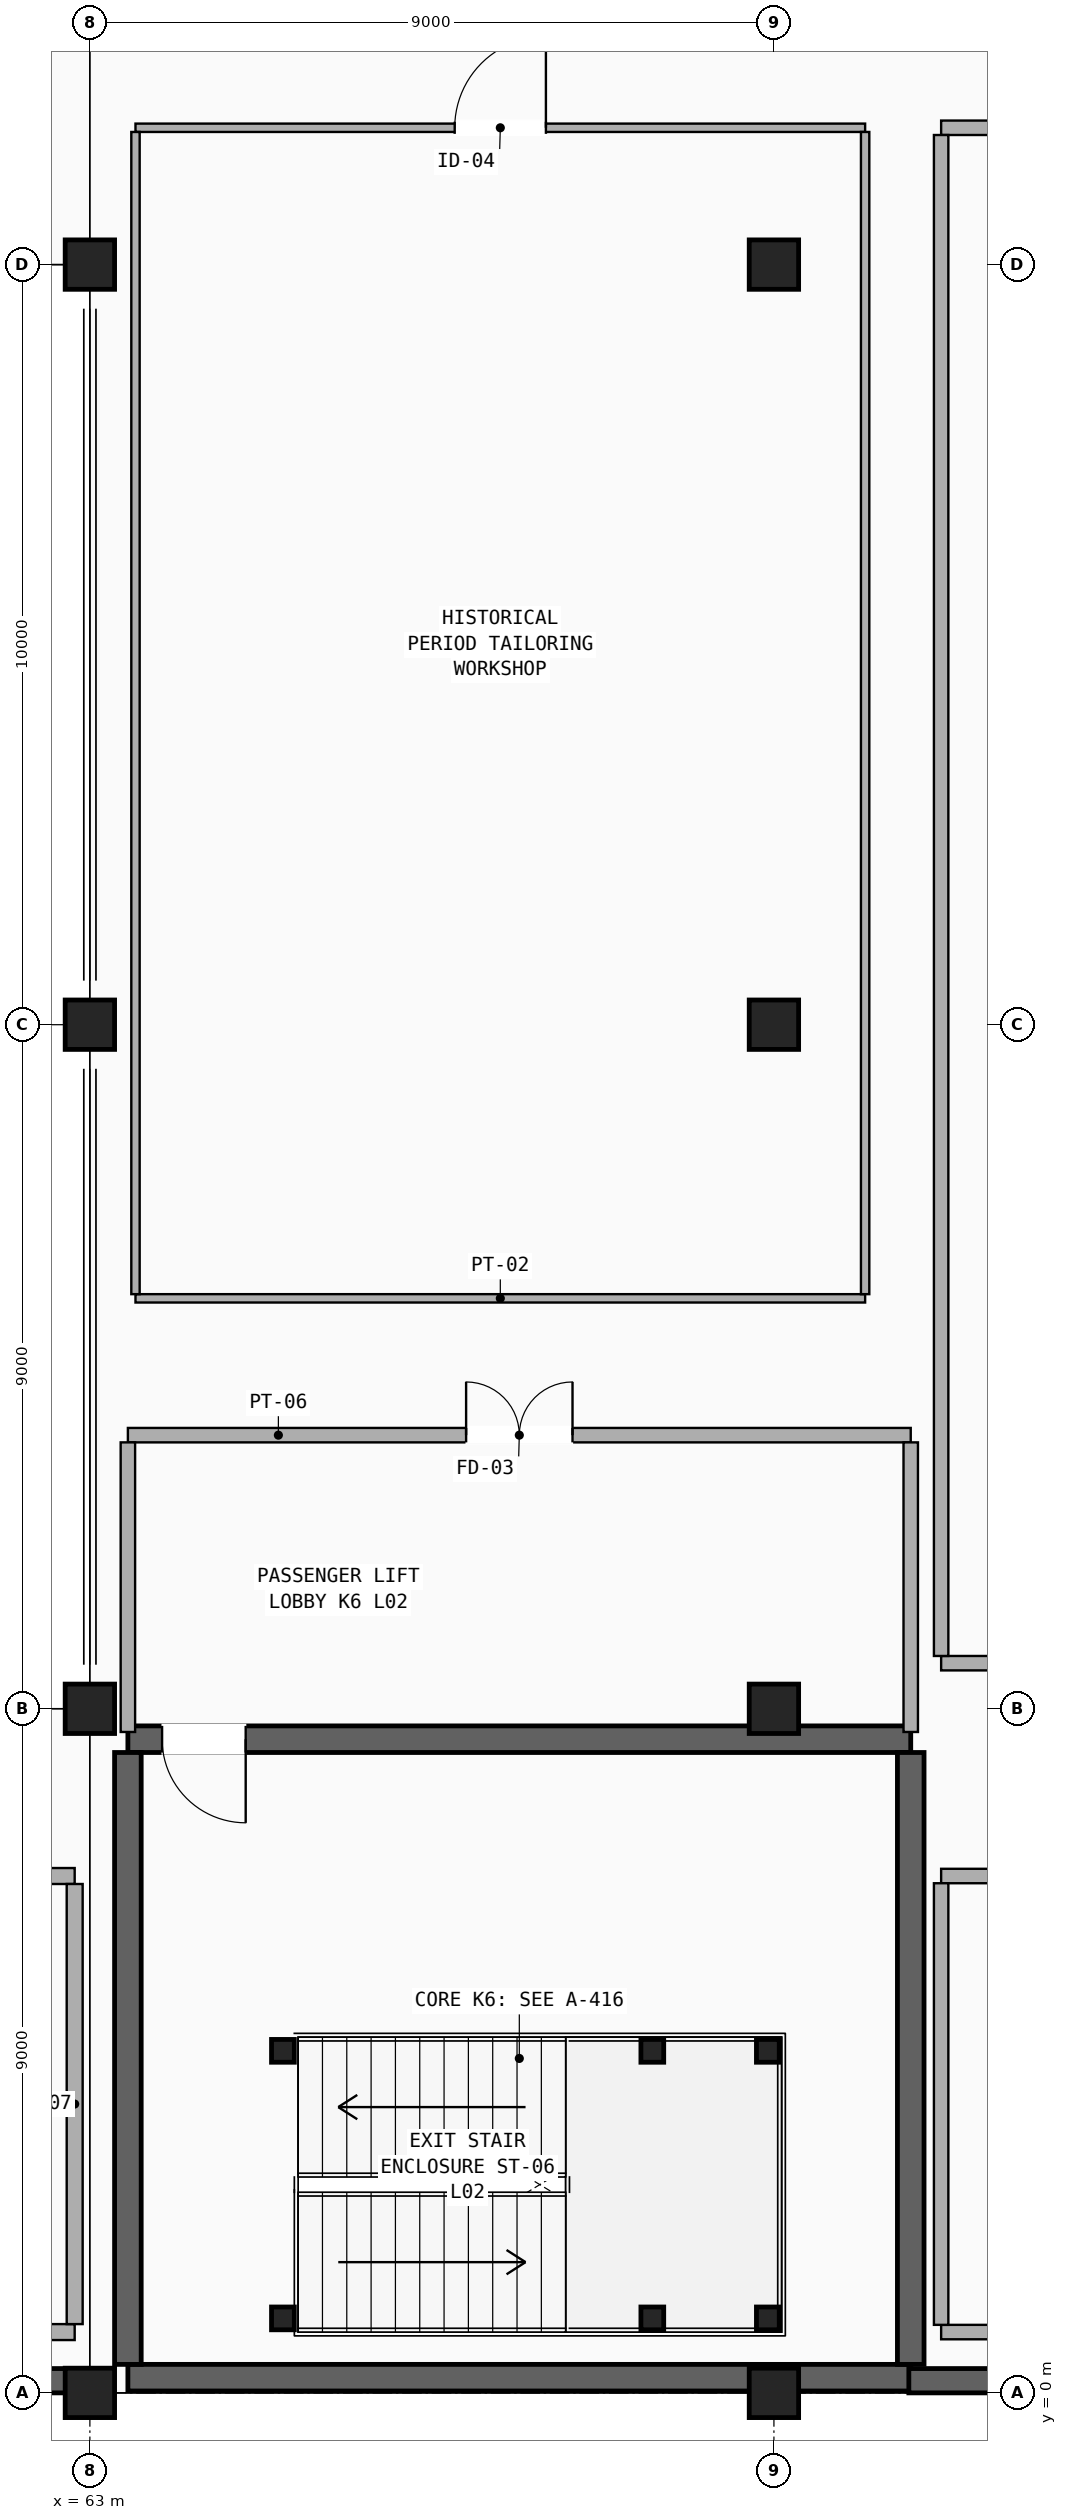
"""IFC4 building model, lengths in metres.
Left out: names, types, materials, properties, quantities, classifications, styles, units other than length and angle.
Written with IfcOpenShell. Run it as: python <this file> out.ifc"""

import sys

from ifc_helpers import new_model, si_unit, direction, frame, frame_2d, origin, origin_2d, place, context, subcontext, project, spatial, rectangle, hollow_rectangle, extrude, element, fill, save


model = new_model("IFC4")
c1 = context("Model", 3, precision=1e-05, world=origin(), true_north=direction((0.0, 1.0)))
c2 = subcontext(c1, "Body", "Model", "MODEL_VIEW")
j1 = project(units=[si_unit("LENGTHUNIT", "METRE"), si_unit("PLANEANGLEUNIT", "RADIAN")], contexts=[c1])
p1 = place(None, origin())
s1 = spatial("IfcSite", under=j1, at=p1, CompositionType="ELEMENT")
p2 = place(p1, origin())
s2 = spatial("IfcBuilding", under=s1, at=p2, CompositionType="ELEMENT")
p3 = place(p2, frame((0.0, 0.0, 9.52)))
s3 = spatial("IfcBuildingStorey", under=s2, at=p3, CompositionType="ELEMENT", Elevation=9.52)
for number, where, z_axis, x_axis in (
    (1, (63.0, 0.0, 0.0), (0.0, 0.0, 1.0), (1.0, 0.0, 0.0)),
    (2, (63.0, 9.0, 0.0), (0.0, 0.0, 1.0), (1.0, 0.0, 0.0)),
    (3, (63.0, 18.0, 0.0), (0.0, 0.0, 1.0), (1.0, 0.0, 0.0)),
    (4, (63.0, 28.0, 0.0), (0.0, 0.0, 1.0), (1.0, 0.0, 0.0)),
    (5, (72.0, 0.0, 0.0), (0.0, 0.0, 1.0), (1.0, 0.0, 0.0)),
    (6, (72.0, 9.0, 0.0), (0.0, 0.0, 1.0), (1.0, 0.0, 0.0)),
    (7, (72.0, 18.0, 0.0), (0.0, 0.0, 1.0), (1.0, 0.0, 0.0)),
    (8, (72.0, 28.0, 0.0), (0.0, 0.0, 1.0), (1.0, 0.0, 0.0)),
):
    element("IfcColumn", number, at=place(p3, frame(where, z_axis=z_axis, x_axis=x_axis)), inside=s3, PredefinedType="COLUMN", context=c2, shape_type="SweptSolid", body=[
        extrude(rectangle(XDim=0.65, YDim=0.65, at=origin_2d()), origin(), (0.0, 0.0, 1.0), 4.08),
    ])
p4 = place(p3, frame((63.5, 0.2, 0.0), z_axis=(0.0, 0.0, 1.0), x_axis=(1.0, 0.0, 0.0)))
e9 = element("IfcWall", 9, at=p4, inside=s3, PredefinedType="SHEAR", context=c2, shape_type="SweptSolid", body=[
    extrude(rectangle(XDim=10.3, YDim=0.35, at=frame_2d((5.15, 0.0))), origin(), (0.0, 0.0, 1.0), 4.08),
])
p5 = place(p3, frame((63.5, 8.6, 0.0), z_axis=(0.0, 0.0, 1.0), x_axis=(1.0, 0.0, 0.0)))
e10 = element("IfcWall", 10, at=p5, inside=s3, PredefinedType="SHEAR", context=c2, shape_type="SweptSolid", body=[
    extrude(rectangle(XDim=10.3, YDim=0.35, at=frame_2d((5.15, 0.0))), origin(), (0.0, 0.0, 1.0), 4.08),
])
p6 = place(p5, frame((0.45, 0.0, 0.0)))
e11 = element("IfcOpeningElement", 11, at=p6, cuts=e10, PredefinedType="OPENING", context=c2, shape_type="SweptSolid", body=[
    extrude(rectangle(XDim=1.1, YDim=2.2, at=frame_2d((0.55, 1.1))), frame((0.0, 0.185, 0.0), z_axis=(0.0, -1.0, 0.0), x_axis=(1.0, 0.0, 0.0)), (0.0, 0.0, 1.0), 0.37),
])
for number, where, z_axis, x_axis in (
    (12, (63.5, 0.375, 0.0), (0.0, 0.0, 1.0), (0.0, 1.0, 0.0)),
    (13, (73.8, 0.375, 0.0), (0.0, 0.0, 1.0), (0.0, 1.0, 0.0)),
):
    element("IfcWall", number, at=place(p3, frame(where, z_axis=z_axis, x_axis=x_axis)), inside=s3, PredefinedType="SHEAR", context=c2, shape_type="SweptSolid", body=[
        extrude(rectangle(XDim=8.05, YDim=0.35, at=frame_2d((4.025, 0.0))), origin(), (0.0, 0.0, 1.0), 4.08),
    ])
p7 = place(p3, frame((18.35, 0.16, 0.0), z_axis=(0.0, 0.0, 1.0), x_axis=(1.0, 0.0, 0.0)))
e14 = element("IfcWall", 14, at=p7, inside=s3, PredefinedType="SHEAR", context=c2, shape_type="SweptSolid", body=[
    extrude(rectangle(XDim=44.95, YDim=0.32, at=frame_2d((22.475, 0.0))), origin(), (0.0, 0.0, 1.0), 4.08),
])
p8 = place(p3, frame((73.775, 0.16, 0.0), z_axis=(0.0, 0.0, 1.0), x_axis=(1.0, 0.0, 0.0)))
e15 = element("IfcWall", 15, at=p8, inside=s3, PredefinedType="SHEAR", context=c2, shape_type="SweptSolid", body=[
    extrude(rectangle(XDim=79.875, YDim=0.32, at=frame_2d((39.938, 0.0))), origin(), (0.0, 0.0, 1.0), 4.08),
])
for number, where, z_axis, x_axis in (
    (16, (65.54, 0.98, 0.0), (0.0, 0.0, 1.0), (1.0, 0.0, 0.0)),
    (17, (65.54, 4.5, 0.0), (0.0, 0.0, 1.0), (1.0, 0.0, 0.0)),
    (18, (70.4, 0.98, 0.0), (0.0, 0.0, 1.0), (1.0, 0.0, 0.0)),
    (19, (70.4, 4.5, 0.0), (0.0, 0.0, 1.0), (1.0, 0.0, 0.0)),
    (20, (71.92, 0.98, 0.0), (0.0, 0.0, 1.0), (1.0, 0.0, 0.0)),
    (21, (71.92, 4.5, 0.0), (0.0, 0.0, 1.0), (1.0, 0.0, 0.0)),
):
    element("IfcColumn", number, at=place(p3, frame(where, z_axis=z_axis, x_axis=x_axis)), inside=s3, PredefinedType="COLUMN", context=c2, shape_type="SweptSolid", body=[
        extrude(hollow_rectangle(XDim=0.3, YDim=0.3, WallThickness=0.016, InnerFilletRadius=0.016, OuterFilletRadius=0.032, at=origin_2d()), origin(), (0.0, 0.0, 1.0), 4.08),
    ])
p9 = place(p3, frame((63.5, 12.6, 0.0), z_axis=(0.0, 0.0, 1.0), x_axis=(1.0, 0.0, 0.0)))
e22 = element("IfcWall", 22, at=p9, inside=s3, PredefinedType="PARTITIONING", context=c2, shape_type="SweptSolid", body=[
    extrude(rectangle(XDim=10.3, YDim=0.19, at=frame_2d((5.15, 0.0))), origin(), (0.0, 0.0, 1.0), 3.14),
])
p10 = place(p9, frame((4.45, 0.0, 0.0)))
e23 = element("IfcOpeningElement", 23, at=p10, cuts=e22, PredefinedType="OPENING", context=c2, shape_type="SweptSolid", body=[
    extrude(rectangle(XDim=1.4, YDim=2.2, at=frame_2d((0.7, 1.1))), frame((0.0, 0.105, 0.0), z_axis=(0.0, -1.0, 0.0), x_axis=(1.0, 0.0, 0.0)), (0.0, 0.0, 1.0), 0.21),
])
p11 = place(p3, frame((63.5, 8.695, 0.0), z_axis=(0.0, 0.0, 1.0), x_axis=(0.0, 1.0, 0.0)))
e24 = element("IfcWall", 24, at=p11, inside=s3, PredefinedType="PARTITIONING", context=c2, shape_type="SweptSolid", body=[
    extrude(rectangle(XDim=3.81, YDim=0.19, at=frame_2d((1.905, 0.0))), origin(), (0.0, 0.0, 1.0), 2.97),
])
p12 = place(p3, frame((73.8, 8.695, 0.0), z_axis=(0.0, 0.0, 1.0), x_axis=(0.0, 1.0, 0.0)))
e25 = element("IfcWall", 25, at=p12, inside=s3, PredefinedType="PARTITIONING", context=c2, shape_type="SweptSolid", body=[
    extrude(rectangle(XDim=3.81, YDim=0.19, at=frame_2d((1.905, 0.0))), origin(), (0.0, 0.0, 1.0), 3.07),
])
p13 = place(p3, frame((74.2, 9.6, 0.0), z_axis=(0.0, 0.0, 1.0), x_axis=(1.0, 0.0, 0.0)))
e26 = element("IfcWall", 26, at=p13, inside=s3, PredefinedType="PARTITIONING", context=c2, shape_type="SweptSolid", body=[
    extrude(rectangle(XDim=38.2, YDim=0.19, at=frame_2d((19.1, 0.0))), origin(), (0.0, 0.0, 1.0), 2.97),
])
p14 = place(p3, frame((74.2, 29.8, 0.0), z_axis=(0.0, 0.0, 1.0), x_axis=(1.0, 0.0, 0.0)))
e27 = element("IfcWall", 27, at=p14, inside=s3, PredefinedType="PARTITIONING", context=c2, shape_type="SweptSolid", body=[
    extrude(rectangle(XDim=38.2, YDim=0.19, at=frame_2d((19.1, 0.0))), origin(), (0.0, 0.0, 1.0), 2.94),
])
p15 = place(p14, frame((18.3, 0.0, 0.0)))
e28 = element("IfcOpeningElement", 28, at=p15, cuts=e27, PredefinedType="OPENING", context=c2, shape_type="SweptSolid", body=[
    extrude(rectangle(XDim=1.6, YDim=2.25, at=frame_2d((0.8, 1.125))), frame((0.0, 0.105, 0.0), z_axis=(0.0, -1.0, 0.0), x_axis=(1.0, 0.0, 0.0)), (0.0, 0.0, 1.0), 0.21),
])
p16 = place(p3, frame((74.2, 9.695, 0.0), z_axis=(0.0, 0.0, 1.0), x_axis=(0.0, 1.0, 0.0)))
e29 = element("IfcWall", 29, at=p16, inside=s3, PredefinedType="PARTITIONING", context=c2, shape_type="SweptSolid", body=[
    extrude(rectangle(XDim=20.01, YDim=0.19, at=frame_2d((10.005, 0.0))), origin(), (0.0, 0.0, 1.0), 2.82),
])
p17 = place(p3, frame((38.4, 0.8, 0.0), z_axis=(0.0, 0.0, 1.0), x_axis=(1.0, 0.0, 0.0)))
e30 = element("IfcWall", 30, at=p17, inside=s3, PredefinedType="PARTITIONING", context=c2, shape_type="SweptSolid", body=[
    extrude(rectangle(XDim=24.4, YDim=0.21, at=frame_2d((12.2, 0.0))), origin(), (0.0, 0.0, 1.0), 3.14),
])
p18 = place(p3, frame((38.4, 6.8, 0.0), z_axis=(0.0, 0.0, 1.0), x_axis=(1.0, 0.0, 0.0)))
e31 = element("IfcWall", 31, at=p18, inside=s3, PredefinedType="PARTITIONING", context=c2, shape_type="SweptSolid", body=[
    extrude(rectangle(XDim=24.4, YDim=0.21, at=frame_2d((12.2, 0.0))), origin(), (0.0, 0.0, 1.0), 3.14),
])
p19 = place(p18, frame((11.6, 0.0, 0.0)))
e32 = element("IfcOpeningElement", 32, at=p19, cuts=e31, PredefinedType="OPENING", context=c2, shape_type="SweptSolid", body=[
    extrude(rectangle(XDim=1.2, YDim=2.2, at=frame_2d((0.6, 1.1))), frame((0.0, 0.115, 0.0), z_axis=(0.0, -1.0, 0.0), x_axis=(1.0, 0.0, 0.0)), (0.0, 0.0, 1.0), 0.23),
])
p20 = place(p3, frame((62.8, 0.905, 0.0), z_axis=(0.0, 0.0, 1.0), x_axis=(0.0, 1.0, 0.0)))
e33 = element("IfcWall", 33, at=p20, inside=s3, PredefinedType="PARTITIONING", context=c2, shape_type="SweptSolid", body=[
    extrude(rectangle(XDim=5.79, YDim=0.21, at=frame_2d((2.895, 0.0))), origin(), (0.0, 0.0, 1.0), 3.14),
])
p21 = place(p3, frame((63.6, 14.4, 0.0), z_axis=(0.0, 0.0, 1.0), x_axis=(1.0, 0.0, 0.0)))
e34 = element("IfcWall", 34, at=p21, inside=s3, PredefinedType="PARTITIONING", context=c2, shape_type="SweptSolid", body=[
    extrude(rectangle(XDim=9.6, YDim=0.11, at=frame_2d((4.8, 0.0))), origin(), (0.0, 0.0, 1.0), 3.14),
])
p22 = place(p3, frame((63.6, 29.8, 0.0), z_axis=(0.0, 0.0, 1.0), x_axis=(1.0, 0.0, 0.0)))
e35 = element("IfcWall", 35, at=p22, inside=s3, PredefinedType="PARTITIONING", context=c2, shape_type="SweptSolid", body=[
    extrude(rectangle(XDim=9.6, YDim=0.11, at=frame_2d((4.8, 0.0))), origin(), (0.0, 0.0, 1.0), 2.97),
])
p23 = place(p22, frame((4.2, 0.0, 0.0)))
e36 = element("IfcOpeningElement", 36, at=p23, cuts=e35, PredefinedType="OPENING", context=c2, shape_type="SweptSolid", body=[
    extrude(rectangle(XDim=1.2, YDim=2.2, at=frame_2d((0.6, 1.1))), frame((0.0, 0.065, 0.0), z_axis=(0.0, -1.0, 0.0), x_axis=(1.0, 0.0, 0.0)), (0.0, 0.0, 1.0), 0.13),
])
p24 = place(p3, frame((63.6, 14.455, 0.0), z_axis=(0.0, 0.0, 1.0), x_axis=(0.0, 1.0, 0.0)))
e37 = element("IfcWall", 37, at=p24, inside=s3, PredefinedType="PARTITIONING", context=c2, shape_type="SweptSolid", body=[
    extrude(rectangle(XDim=15.29, YDim=0.11, at=frame_2d((7.645, 0.0))), origin(), (0.0, 0.0, 1.0), 2.92),
])
p25 = place(p3, frame((73.2, 14.455, 0.0), z_axis=(0.0, 0.0, 1.0), x_axis=(0.0, 1.0, 0.0)))
e38 = element("IfcWall", 38, at=p25, inside=s3, PredefinedType="PARTITIONING", context=c2, shape_type="SweptSolid", body=[
    extrude(rectangle(XDim=15.29, YDim=0.11, at=frame_2d((7.645, 0.0))), origin(), (0.0, 0.0, 1.0), 2.82),
])
p26 = place(p3, frame((74.2, 0.8, 0.0), z_axis=(0.0, 0.0, 1.0), x_axis=(1.0, 0.0, 0.0)))
e39 = element("IfcWall", 39, at=p26, inside=s3, PredefinedType="PARTITIONING", context=c2, shape_type="SweptSolid", body=[
    extrude(rectangle(XDim=41.4, YDim=0.19, at=frame_2d((20.7, 0.0))), origin(), (0.0, 0.0, 1.0), 2.97),
])
p27 = place(p3, frame((74.2, 6.8, 0.0), z_axis=(0.0, 0.0, 1.0), x_axis=(1.0, 0.0, 0.0)))
e40 = element("IfcWall", 40, at=p27, inside=s3, PredefinedType="PARTITIONING", context=c2, shape_type="SweptSolid", body=[
    extrude(rectangle(XDim=41.4, YDim=0.19, at=frame_2d((20.7, 0.0))), origin(), (0.0, 0.0, 1.0), 2.97),
])
p28 = place(p27, frame((20.1, 0.0, 0.0)))
e41 = element("IfcOpeningElement", 41, at=p28, cuts=e40, PredefinedType="OPENING", context=c2, shape_type="SweptSolid", body=[
    extrude(rectangle(XDim=1.2, YDim=2.2, at=frame_2d((0.6, 1.1))), frame((0.0, 0.105, 0.0), z_axis=(0.0, -1.0, 0.0), x_axis=(1.0, 0.0, 0.0)), (0.0, 0.0, 1.0), 0.21),
])
p29 = place(p3, frame((74.2, 0.895, 0.0), z_axis=(0.0, 0.0, 1.0), x_axis=(0.0, 1.0, 0.0)))
e42 = element("IfcWall", 42, at=p29, inside=s3, PredefinedType="PARTITIONING", context=c2, shape_type="SweptSolid", body=[
    extrude(rectangle(XDim=5.81, YDim=0.19, at=frame_2d((2.905, 0.0))), origin(), (0.0, 0.0, 1.0), 3.84),
])
p30 = place(p6, frame((1.1, 0.0, 0.0), z_axis=(0.0, 0.0, 1.0), x_axis=(-1.0, 0.0, 0.0)))
e43 = element("IfcDoor", 43, at=p30, inside=s3, OperationType="SINGLE_SWING_LEFT", PredefinedType="DOOR", context=c2, shape_type="SweptSolid", body=[
    extrude(rectangle(XDim=1.1, YDim=2.2, at=frame_2d((0.55, 1.1))), frame((0.0, 0.025, 0.0), z_axis=(0.0, -1.0, 0.0), x_axis=(1.0, 0.0, 0.0)), (0.0, 0.0, 1.0), 0.05),
])
fill(e11, e43)
p31 = place(p10, origin())
e44 = element("IfcDoor", 44, at=p31, inside=s3, OperationType="DOUBLE_DOOR_SINGLE_SWING", PredefinedType="DOOR", context=c2, shape_type="SweptSolid", body=[
    extrude(rectangle(XDim=1.4, YDim=2.2, at=frame_2d((0.7, 1.1))), frame((0.0, 0.025, 0.0), z_axis=(0.0, -1.0, 0.0), x_axis=(1.0, 0.0, 0.0)), (0.0, 0.0, 1.0), 0.05),
])
fill(e23, e44)
p32 = place(p23, origin())
e45 = element("IfcDoor", 45, at=p32, inside=s3, OperationType="SINGLE_SWING_RIGHT", PredefinedType="DOOR", context=c2, shape_type="SweptSolid", body=[
    extrude(rectangle(XDim=1.2, YDim=2.2, at=frame_2d((0.6, 1.1))), frame((0.0, 0.025, 0.0), z_axis=(0.0, -1.0, 0.0), x_axis=(1.0, 0.0, 0.0)), (0.0, 0.0, 1.0), 0.05),
])
fill(e36, e45)
save(model, sys.argv[1])
